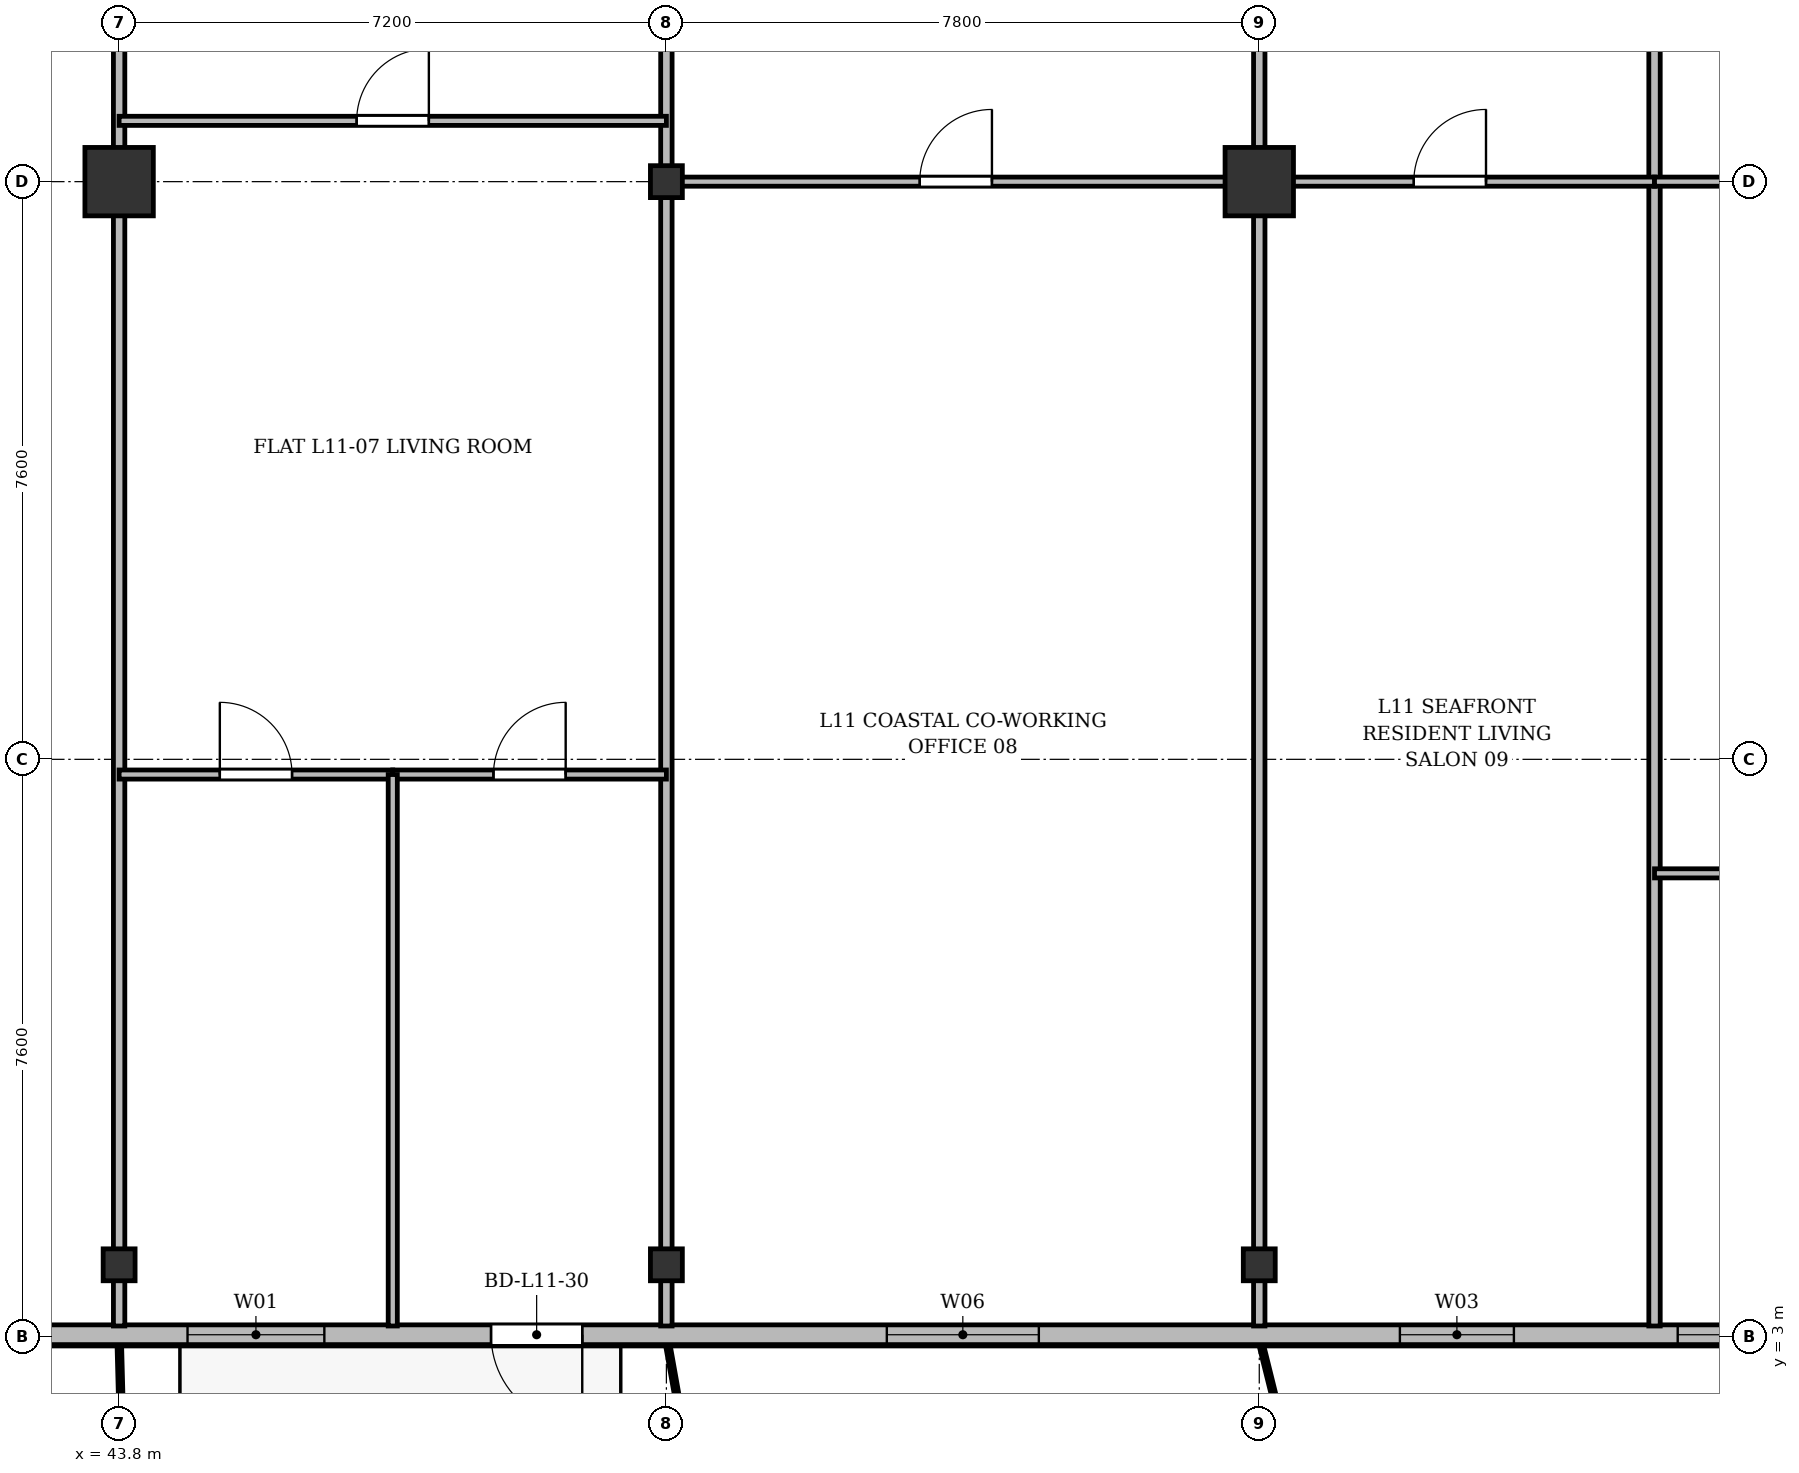
"""IFC4 building model, lengths in metres.
Left out: names, types, materials, properties, quantities, classifications, styles, units other than length and angle.
Written with IfcOpenShell. Run it as: python <this file> out.ifc"""

import sys

from ifc_helpers import new_model, si_unit, direction, frame, frame_2d, origin, origin_2d, place, context, subcontext, project, spatial, rectangle, i_section, extrude, source, transform, mapped, element, fill, save


model = new_model("IFC4")
c1 = context("Model", 3, precision=1e-05, world=origin(), true_north=direction((0.0, 1.0)))
c2 = subcontext(c1, "Body", "Model", "MODEL_VIEW")
j1 = project(units=[si_unit("LENGTHUNIT", "METRE"), si_unit("PLANEANGLEUNIT", "RADIAN")], contexts=[c1])
p1 = place(None, origin())
s1 = spatial("IfcSite", under=j1, at=p1, CompositionType="ELEMENT")
p2 = place(p1, origin())
s2 = spatial("IfcBuilding", under=s1, at=p2, CompositionType="ELEMENT")
p3 = place(p2, frame((0.0, 0.0, 45.1)))
s3 = spatial("IfcBuildingStorey", under=s2, at=p3, CompositionType="ELEMENT", Elevation=45.1)
m1 = source(origin(), c2, "Body", "SweptSolid", [
    extrude(i_section(OverallWidth=0.42, OverallDepth=0.42, WebThickness=0.026, FlangeThickness=0.04, at=origin_2d()), origin(), (0.0, 0.0, 1.0), 3.6),
])
p4 = place(p3, frame((43.8, 3.95, 0.0), z_axis=(0.0, 0.0, 1.0), x_axis=(1.0, 0.0, 0.0)))
e1 = element("IfcColumn", 1, at=p4, inside=s3, PredefinedType="COLUMN", context=c2, shape_type="MappedRepresentation", body=[
    mapped(m1, transform((0.0, 0.0, 0.0), x_axis=(1.0, 0.0, 0.0), y_axis=(0.0, 1.0, 0.0), z_axis=(0.0, 0.0, 1.0), scale=1.0)),
])
m2 = source(origin(), c2, "Body", "SweptSolid", [
    extrude(rectangle(XDim=0.9, YDim=0.9, at=origin_2d()), origin(), (0.0, 0.0, 1.0), 3.6),
])
p5 = place(p3, frame((43.8, 18.2, 0.0), z_axis=(0.0, 0.0, 1.0), x_axis=(1.0, 0.0, 0.0)))
e2 = element("IfcColumn", 2, at=p5, inside=s3, PredefinedType="COLUMN", context=c2, shape_type="MappedRepresentation", body=[
    mapped(m2, transform((0.0, 0.0, 0.0), x_axis=(1.0, 0.0, 0.0), y_axis=(0.0, 1.0, 0.0), z_axis=(0.0, 0.0, 1.0), scale=1.0)),
])
for number, where, z_axis, x_axis in (
    (3, (51.0, 3.95, 0.0), (0.0, 0.0, 1.0), (1.0, 0.0, 0.0)),
    (4, (51.0, 18.2, 0.0), (0.0, 0.0, 1.0), (1.0, 0.0, 0.0)),
    (5, (58.8, 3.95, 0.0), (0.0, 0.0, 1.0), (1.0, 0.0, 0.0)),
):
    element("IfcColumn", number, at=place(p3, frame(where, z_axis=z_axis, x_axis=x_axis)), inside=s3, PredefinedType="COLUMN", context=c2, shape_type="MappedRepresentation", body=[
        mapped(m1, transform((0.0, 0.0, 0.0), x_axis=(1.0, 0.0, 0.0), y_axis=(0.0, 1.0, 0.0), z_axis=(0.0, 0.0, 1.0), scale=1.0)),
    ])
p6 = place(p3, frame((58.8, 18.2, 0.0), z_axis=(0.0, 0.0, 1.0), x_axis=(1.0, 0.0, 0.0)))
e6 = element("IfcColumn", 6, at=p6, inside=s3, PredefinedType="COLUMN", context=c2, shape_type="MappedRepresentation", body=[
    mapped(m2, transform((0.0, 0.0, 0.0), x_axis=(1.0, 0.0, 0.0), y_axis=(0.0, 1.0, 0.0), z_axis=(0.0, 0.0, 1.0), scale=1.0)),
])
p7 = place(p3, frame((66.9, 3.03, 0.0), z_axis=(0.0, 0.0, 1.0), x_axis=(-1.0, 0.0, 0.0)))
e7 = element("IfcWall", 7, at=p7, inside=s3, PredefinedType="SOLIDWALL", context=c2, shape_type="SweptSolid", body=[
    extrude(rectangle(XDim=59.4, YDim=0.26, at=frame_2d((29.7, 0.0))), origin(), (0.0, 0.0, 1.0), 3.34),
])
p8 = place(p7, frame((0.395, 0.0, 0.9)))
e8 = element("IfcOpeningElement", 8, at=p8, cuts=e7, PredefinedType="OPENING", context=c2, shape_type="SweptSolid", body=[
    extrude(rectangle(XDim=2.2, YDim=1.8, at=frame_2d((1.1, 0.9))), frame((0.0, 0.14, 0.0), z_axis=(0.0, -1.0, 0.0), x_axis=(1.0, 0.0, 0.0)), (0.0, 0.0, 1.0), 0.28),
])
p9 = place(p7, frame((4.75, 0.0, 0.9)))
e9 = element("IfcOpeningElement", 9, at=p9, cuts=e7, PredefinedType="OPENING", context=c2, shape_type="SweptSolid", body=[
    extrude(rectangle(XDim=1.5, YDim=1.75, at=frame_2d((0.75, 0.875))), frame((0.0, 0.14, 0.0), z_axis=(0.0, -1.0, 0.0), x_axis=(1.0, 0.0, 0.0)), (0.0, 0.0, 1.0), 0.28),
])
p10 = place(p7, frame((11.0, 0.0, 0.9)))
e10 = element("IfcOpeningElement", 10, at=p10, cuts=e7, PredefinedType="OPENING", context=c2, shape_type="SweptSolid", body=[
    extrude(rectangle(XDim=2.0, YDim=1.95, at=frame_2d((1.0, 0.975))), frame((0.0, 0.14, 0.0), z_axis=(0.0, -1.0, 0.0), x_axis=(1.0, 0.0, 0.0)), (0.0, 0.0, 1.0), 0.28),
])
p11 = place(p7, frame((17.007, 0.0, 0.0)))
e11 = element("IfcOpeningElement", 11, at=p11, cuts=e7, PredefinedType="OPENING", context=c2, shape_type="SweptSolid", body=[
    extrude(rectangle(XDim=1.2, YDim=2.2, at=frame_2d((0.6, 1.1))), frame((0.0, 0.14, 0.0), z_axis=(0.0, -1.0, 0.0), x_axis=(1.0, 0.0, 0.0)), (0.0, 0.0, 1.0), 0.28),
])
p12 = place(p7, frame((20.4, 0.0, 0.9)))
e12 = element("IfcOpeningElement", 12, at=p12, cuts=e7, PredefinedType="OPENING", context=c2, shape_type="SweptSolid", body=[
    extrude(rectangle(XDim=1.8, YDim=1.8, at=frame_2d((0.9, 0.9))), frame((0.0, 0.14, 0.0), z_axis=(0.0, -1.0, 0.0), x_axis=(1.0, 0.0, 0.0)), (0.0, 0.0, 1.0), 0.28),
])
p13 = place(p7, frame((24.4, 0.0, 0.9)))
e13 = element("IfcOpeningElement", 13, at=p13, cuts=e7, PredefinedType="OPENING", context=c2, shape_type="SweptSolid", body=[
    extrude(rectangle(XDim=2.2, YDim=1.8, at=frame_2d((1.1, 0.9))), frame((0.0, 0.14, 0.0), z_axis=(0.0, -1.0, 0.0), x_axis=(1.0, 0.0, 0.0)), (0.0, 0.0, 1.0), 0.28),
])
p14 = place(p7, frame((31.35, 0.0, 0.9)))
e14 = element("IfcOpeningElement", 14, at=p14, cuts=e7, PredefinedType="OPENING", context=c2, shape_type="SweptSolid", body=[
    extrude(rectangle(XDim=1.5, YDim=1.75, at=frame_2d((0.75, 0.875))), frame((0.0, 0.14, 0.0), z_axis=(0.0, -1.0, 0.0), x_axis=(1.0, 0.0, 0.0)), (0.0, 0.0, 1.0), 0.28),
])
p15 = place(p7, frame((38.9, 0.0, 0.9)))
e15 = element("IfcOpeningElement", 15, at=p15, cuts=e7, PredefinedType="OPENING", context=c2, shape_type="SweptSolid", body=[
    extrude(rectangle(XDim=2.0, YDim=1.95, at=frame_2d((1.0, 0.975))), frame((0.0, 0.14, 0.0), z_axis=(0.0, -1.0, 0.0), x_axis=(1.0, 0.0, 0.0)), (0.0, 0.0, 1.0), 0.28),
])
p16 = place(p7, frame((45.435, 0.0, 0.0)))
e16 = element("IfcOpeningElement", 16, at=p16, cuts=e7, PredefinedType="OPENING", context=c2, shape_type="SweptSolid", body=[
    extrude(rectangle(XDim=1.2, YDim=2.2, at=frame_2d((0.6, 1.1))), frame((0.0, 0.14, 0.0), z_axis=(0.0, -1.0, 0.0), x_axis=(1.0, 0.0, 0.0)), (0.0, 0.0, 1.0), 0.28),
])
p17 = place(p7, frame((48.45, 0.0, 0.9)))
e17 = element("IfcOpeningElement", 17, at=p17, cuts=e7, PredefinedType="OPENING", context=c2, shape_type="SweptSolid", body=[
    extrude(rectangle(XDim=1.8, YDim=1.8, at=frame_2d((0.9, 0.9))), frame((0.0, 0.14, 0.0), z_axis=(0.0, -1.0, 0.0), x_axis=(1.0, 0.0, 0.0)), (0.0, 0.0, 1.0), 0.28),
])
p18 = place(p7, frame((52.0, 0.0, 0.9)))
e18 = element("IfcOpeningElement", 18, at=p18, cuts=e7, PredefinedType="OPENING", context=c2, shape_type="SweptSolid", body=[
    extrude(rectangle(XDim=2.2, YDim=1.8, at=frame_2d((1.1, 0.9))), frame((0.0, 0.14, 0.0), z_axis=(0.0, -1.0, 0.0), x_axis=(1.0, 0.0, 0.0)), (0.0, 0.0, 1.0), 0.28),
])
p19 = place(p7, frame((56.355, 0.0, 0.9)))
e19 = element("IfcOpeningElement", 19, at=p19, cuts=e7, PredefinedType="OPENING", context=c2, shape_type="SweptSolid", body=[
    extrude(rectangle(XDim=1.5, YDim=1.75, at=frame_2d((0.75, 0.875))), frame((0.0, 0.14, 0.0), z_axis=(0.0, -1.0, 0.0), x_axis=(1.0, 0.0, 0.0)), (0.0, 0.0, 1.0), 0.28),
])
for number, where, z_axis, x_axis in (
    (20, (43.8, 3.145, 0.0), (0.0, 0.0, 1.0), (0.0, 1.0, 0.0)),
    (21, (51.0, 3.145, 0.0), (0.0, 0.0, 1.0), (0.0, 1.0, 0.0)),
    (22, (58.8, 3.145, 0.0), (0.0, 0.0, 1.0), (0.0, 1.0, 0.0)),
):
    element("IfcWall", number, at=place(p3, frame(where, z_axis=z_axis, x_axis=x_axis)), inside=s3, PredefinedType="PARTITIONING", context=c2, shape_type="SweptSolid", body=[
        extrude(rectangle(XDim=24.455, YDim=0.15, at=frame_2d((12.228, 0.0))), origin(), (0.0, 0.0, 1.0), 2.752),
    ])
p20 = place(p3, frame((64.0, 3.145, 0.0), z_axis=(0.0, 0.0, 1.0), x_axis=(0.0, 1.0, 0.0)))
e23 = element("IfcWall", 23, at=p20, inside=s3, PredefinedType="PARTITIONING", context=c2, shape_type="SweptSolid", body=[
    extrude(rectangle(XDim=24.455, YDim=0.15, at=frame_2d((12.228, 0.0))), origin(), (0.0, 0.0, 1.0), 2.69),
])
p21 = place(p3, frame((43.8, 19.0, 0.0), z_axis=(0.0, 0.0, 1.0), x_axis=(1.0, 0.0, 0.0)))
e24 = element("IfcWall", 24, at=p21, inside=s3, PredefinedType="PARTITIONING", context=c2, shape_type="SweptSolid", body=[
    extrude(rectangle(XDim=7.2, YDim=0.12, at=frame_2d((3.6, 0.0))), origin(), (0.0, 0.0, 1.0), 2.752),
])
p22 = place(p21, frame((3.125, 0.0, 0.0)))
e25 = element("IfcOpeningElement", 25, at=p22, cuts=e24, PredefinedType="OPENING", context=c2, shape_type="SweptSolid", body=[
    extrude(rectangle(XDim=0.95, YDim=2.15, at=frame_2d((0.475, 1.075))), frame((0.0, 0.07, 0.0), z_axis=(0.0, -1.0, 0.0), x_axis=(1.0, 0.0, 0.0)), (0.0, 0.0, 1.0), 0.14),
])
p23 = place(p3, frame((43.8, 10.4, 0.0), z_axis=(0.0, 0.0, 1.0), x_axis=(1.0, 0.0, 0.0)))
e26 = element("IfcWall", 26, at=p23, inside=s3, PredefinedType="PARTITIONING", context=c2, shape_type="SweptSolid", body=[
    extrude(rectangle(XDim=3.6, YDim=0.12, at=frame_2d((1.8, 0.0))), origin(), (0.0, 0.0, 1.0), 2.752),
])
p24 = place(p23, frame((1.325, 0.0, 0.0)))
e27 = element("IfcOpeningElement", 27, at=p24, cuts=e26, PredefinedType="OPENING", context=c2, shape_type="SweptSolid", body=[
    extrude(rectangle(XDim=0.95, YDim=2.15, at=frame_2d((0.475, 1.075))), frame((0.0, 0.07, 0.0), z_axis=(0.0, -1.0, 0.0), x_axis=(1.0, 0.0, 0.0)), (0.0, 0.0, 1.0), 0.14),
])
p25 = place(p3, frame((47.4, 10.4, 0.0), z_axis=(0.0, 0.0, 1.0), x_axis=(1.0, 0.0, 0.0)))
e28 = element("IfcWall", 28, at=p25, inside=s3, PredefinedType="PARTITIONING", context=c2, shape_type="SweptSolid", body=[
    extrude(rectangle(XDim=3.6, YDim=0.12, at=frame_2d((1.8, 0.0))), origin(), (0.0, 0.0, 1.0), 2.752),
])
p26 = place(p25, frame((1.325, 0.0, 0.0)))
e29 = element("IfcOpeningElement", 29, at=p26, cuts=e28, PredefinedType="OPENING", context=c2, shape_type="SweptSolid", body=[
    extrude(rectangle(XDim=0.95, YDim=2.15, at=frame_2d((0.475, 1.075))), frame((0.0, 0.07, 0.0), z_axis=(0.0, -1.0, 0.0), x_axis=(1.0, 0.0, 0.0)), (0.0, 0.0, 1.0), 0.14),
])
p27 = place(p3, frame((47.4, 3.145, 0.0), z_axis=(0.0, 0.0, 1.0), x_axis=(0.0, 1.0, 0.0)))
e30 = element("IfcWall", 30, at=p27, inside=s3, PredefinedType="PARTITIONING", context=c2, shape_type="SweptSolid", body=[
    extrude(rectangle(XDim=7.255, YDim=0.12, at=frame_2d((3.627, 0.0))), origin(), (0.0, 0.0, 1.0), 2.69),
])
p28 = place(p3, frame((51.0, 18.2, 0.0), z_axis=(0.0, 0.0, 1.0), x_axis=(1.0, 0.0, 0.0)))
e31 = element("IfcWall", 31, at=p28, inside=s3, PredefinedType="PARTITIONING", context=c2, shape_type="SweptSolid", body=[
    extrude(rectangle(XDim=7.8, YDim=0.12, at=frame_2d((3.9, 0.0))), origin(), (0.0, 0.0, 1.0), 2.69),
])
p29 = place(p28, frame((3.333, 0.0, 0.0)))
e32 = element("IfcOpeningElement", 32, at=p29, cuts=e31, PredefinedType="OPENING", context=c2, shape_type="SweptSolid", body=[
    extrude(rectangle(XDim=0.95, YDim=2.15, at=frame_2d((0.475, 1.075))), frame((0.0, 0.07, 0.0), z_axis=(0.0, -1.0, 0.0), x_axis=(1.0, 0.0, 0.0)), (0.0, 0.0, 1.0), 0.14),
])
p30 = place(p3, frame((58.8, 18.2, 0.0), z_axis=(0.0, 0.0, 1.0), x_axis=(1.0, 0.0, 0.0)))
e33 = element("IfcWall", 33, at=p30, inside=s3, PredefinedType="PARTITIONING", context=c2, shape_type="SweptSolid", body=[
    extrude(rectangle(XDim=5.2, YDim=0.12, at=frame_2d((2.6, 0.0))), origin(), (0.0, 0.0, 1.0), 2.69),
])
p31 = place(p30, frame((2.033, 0.0, 0.0)))
e34 = element("IfcOpeningElement", 34, at=p31, cuts=e33, PredefinedType="OPENING", context=c2, shape_type="SweptSolid", body=[
    extrude(rectangle(XDim=0.95, YDim=2.15, at=frame_2d((0.475, 1.075))), frame((0.0, 0.07, 0.0), z_axis=(0.0, -1.0, 0.0), x_axis=(1.0, 0.0, 0.0)), (0.0, 0.0, 1.0), 0.14),
])
p32 = place(p3, frame((64.0, 18.2, 0.0), z_axis=(0.0, 0.0, 1.0), x_axis=(1.0, 0.0, 0.0)))
e35 = element("IfcWall", 35, at=p32, inside=s3, PredefinedType="PARTITIONING", context=c2, shape_type="SweptSolid", body=[
    extrude(rectangle(XDim=5.64, YDim=0.12, at=frame_2d((2.82, 0.0))), origin(), (0.0, 0.0, 1.0), 2.69),
])
p33 = place(p32, frame((2.626, 0.0, 0.0)))
e36 = element("IfcOpeningElement", 36, at=p33, cuts=e35, PredefinedType="OPENING", context=c2, shape_type="SweptSolid", body=[
    extrude(rectangle(XDim=0.95, YDim=2.15, at=frame_2d((0.475, 1.075))), frame((0.0, 0.07, 0.0), z_axis=(0.0, -1.0, 0.0), x_axis=(1.0, 0.0, 0.0)), (0.0, 0.0, 1.0), 0.14),
])
p34 = place(p3, frame((64.0, 9.1, 0.0), z_axis=(0.0, 0.0, 1.0), x_axis=(1.0, 0.0, 0.0)))
e37 = element("IfcWall", 37, at=p34, inside=s3, PredefinedType="PARTITIONING", context=c2, shape_type="SweptSolid", body=[
    extrude(rectangle(XDim=5.64, YDim=0.12, at=frame_2d((2.82, 0.0))), origin(), (0.0, 0.0, 1.0), 2.752),
])
p35 = place(p34, frame((2.251, 0.0, 0.0)))
e38 = element("IfcOpeningElement", 38, at=p35, cuts=e37, PredefinedType="OPENING", context=c2, shape_type="SweptSolid", body=[
    extrude(rectangle(XDim=0.95, YDim=2.15, at=frame_2d((0.475, 1.075))), frame((0.0, 0.07, 0.0), z_axis=(0.0, -1.0, 0.0), x_axis=(1.0, 0.0, 0.0)), (0.0, 0.0, 1.0), 0.14),
])
m3 = source(origin(), c2, "Body", "SweptSolid", [
    extrude(rectangle(XDim=2.2, YDim=1.8, at=frame_2d((1.1, 0.9))), frame((0.0, 0.03, 0.0), z_axis=(0.0, -1.0, 0.0), x_axis=(1.0, 0.0, 0.0)), (0.0, 0.0, 1.0), 0.06),
])
p36 = place(p8, origin())
e39 = element("IfcWindow", 39, at=p36, inside=s3, PartitioningType="SINGLE_PANEL", PredefinedType="WINDOW", context=c2, shape_type="MappedRepresentation", body=[
    mapped(m3, transform((0.0, 0.0, 0.0), x_axis=(1.0, 0.0, 0.0), y_axis=(0.0, 1.0, 0.0), z_axis=(0.0, 0.0, 1.0), scale=1.0)),
])
fill(e8, e39)
m4 = source(origin(), c2, "Body", "SweptSolid", [
    extrude(rectangle(XDim=1.5, YDim=1.75, at=frame_2d((0.75, 0.875))), frame((0.0, 0.03, 0.0), z_axis=(0.0, -1.0, 0.0), x_axis=(1.0, 0.0, 0.0)), (0.0, 0.0, 1.0), 0.06),
])
p37 = place(p9, origin())
e40 = element("IfcWindow", 40, at=p37, inside=s3, PartitioningType="SINGLE_PANEL", PredefinedType="WINDOW", context=c2, shape_type="MappedRepresentation", body=[
    mapped(m4, transform((0.0, 0.0, 0.0), x_axis=(1.0, 0.0, 0.0), y_axis=(0.0, 1.0, 0.0), z_axis=(0.0, 0.0, 1.0), scale=1.0)),
])
fill(e9, e40)
m5 = source(origin(), c2, "Body", "SweptSolid", [
    extrude(rectangle(XDim=2.0, YDim=1.95, at=frame_2d((1.0, 0.975))), frame((0.0, 0.03, 0.0), z_axis=(0.0, -1.0, 0.0), x_axis=(1.0, 0.0, 0.0)), (0.0, 0.0, 1.0), 0.06),
])
p38 = place(p10, origin())
e41 = element("IfcWindow", 41, at=p38, inside=s3, PartitioningType="SINGLE_PANEL", PredefinedType="WINDOW", context=c2, shape_type="MappedRepresentation", body=[
    mapped(m5, transform((0.0, 0.0, 0.0), x_axis=(1.0, 0.0, 0.0), y_axis=(0.0, 1.0, 0.0), z_axis=(0.0, 0.0, 1.0), scale=1.0)),
])
fill(e10, e41)
m6 = source(origin(), c2, "Body", "SweptSolid", [
    extrude(rectangle(XDim=1.2, YDim=2.2, at=frame_2d((0.6, 1.1))), frame((0.0, 0.025, 0.0), z_axis=(0.0, -1.0, 0.0), x_axis=(1.0, 0.0, 0.0)), (0.0, 0.0, 1.0), 0.05),
])
p39 = place(p11, origin())
e42 = element("IfcDoor", 42, at=p39, inside=s3, OperationType="SINGLE_SWING_LEFT", PredefinedType="DOOR", context=c2, shape_type="MappedRepresentation", body=[
    mapped(m6, transform((0.0, 0.0, 0.0), x_axis=(1.0, 0.0, 0.0), y_axis=(0.0, 1.0, 0.0), z_axis=(0.0, 0.0, 1.0), scale=1.0)),
])
fill(e11, e42)
m7 = source(origin(), c2, "Body", "SweptSolid", [
    extrude(rectangle(XDim=1.8, YDim=1.8, at=frame_2d((0.9, 0.9))), frame((0.0, 0.03, 0.0), z_axis=(0.0, -1.0, 0.0), x_axis=(1.0, 0.0, 0.0)), (0.0, 0.0, 1.0), 0.06),
])
p40 = place(p12, origin())
e43 = element("IfcWindow", 43, at=p40, inside=s3, PartitioningType="SINGLE_PANEL", PredefinedType="WINDOW", context=c2, shape_type="MappedRepresentation", body=[
    mapped(m7, transform((0.0, 0.0, 0.0), x_axis=(1.0, 0.0, 0.0), y_axis=(0.0, 1.0, 0.0), z_axis=(0.0, 0.0, 1.0), scale=1.0)),
])
fill(e12, e43)
m8 = source(origin(), c2, "Body", "SweptSolid", [
    extrude(rectangle(XDim=0.95, YDim=2.15, at=frame_2d((0.475, 1.075))), frame((0.0, 0.025, 0.0), z_axis=(0.0, -1.0, 0.0), x_axis=(1.0, 0.0, 0.0)), (0.0, 0.0, 1.0), 0.05),
])
p41 = place(p22, origin())
e44 = element("IfcDoor", 44, at=p41, inside=s3, OperationType="SINGLE_SWING_RIGHT", PredefinedType="DOOR", context=c2, shape_type="MappedRepresentation", body=[
    mapped(m8, transform((0.0, 0.0, 0.0), x_axis=(1.0, 0.0, 0.0), y_axis=(0.0, 1.0, 0.0), z_axis=(0.0, 0.0, 1.0), scale=1.0)),
])
fill(e25, e44)
p42 = place(p24, origin())
e45 = element("IfcDoor", 45, at=p42, inside=s3, OperationType="SINGLE_SWING_LEFT", PredefinedType="DOOR", context=c2, shape_type="MappedRepresentation", body=[
    mapped(m8, transform((0.0, 0.0, 0.0), x_axis=(1.0, 0.0, 0.0), y_axis=(0.0, 1.0, 0.0), z_axis=(0.0, 0.0, 1.0), scale=1.0)),
])
fill(e27, e45)
p43 = place(p26, origin())
e46 = element("IfcDoor", 46, at=p43, inside=s3, OperationType="SINGLE_SWING_RIGHT", PredefinedType="DOOR", context=c2, shape_type="MappedRepresentation", body=[
    mapped(m8, transform((0.0, 0.0, 0.0), x_axis=(1.0, 0.0, 0.0), y_axis=(0.0, 1.0, 0.0), z_axis=(0.0, 0.0, 1.0), scale=1.0)),
])
fill(e29, e46)
p44 = place(p29, origin())
e47 = element("IfcDoor", 47, at=p44, inside=s3, OperationType="SINGLE_SWING_RIGHT", PredefinedType="DOOR", context=c2, shape_type="MappedRepresentation", body=[
    mapped(m8, transform((0.0, 0.0, 0.0), x_axis=(1.0, 0.0, 0.0), y_axis=(0.0, 1.0, 0.0), z_axis=(0.0, 0.0, 1.0), scale=1.0)),
])
fill(e32, e47)
p45 = place(p31, origin())
e48 = element("IfcDoor", 48, at=p45, inside=s3, OperationType="SINGLE_SWING_RIGHT", PredefinedType="DOOR", context=c2, shape_type="MappedRepresentation", body=[
    mapped(m8, transform((0.0, 0.0, 0.0), x_axis=(1.0, 0.0, 0.0), y_axis=(0.0, 1.0, 0.0), z_axis=(0.0, 0.0, 1.0), scale=1.0)),
])
fill(e34, e48)
save(model, sys.argv[1])
